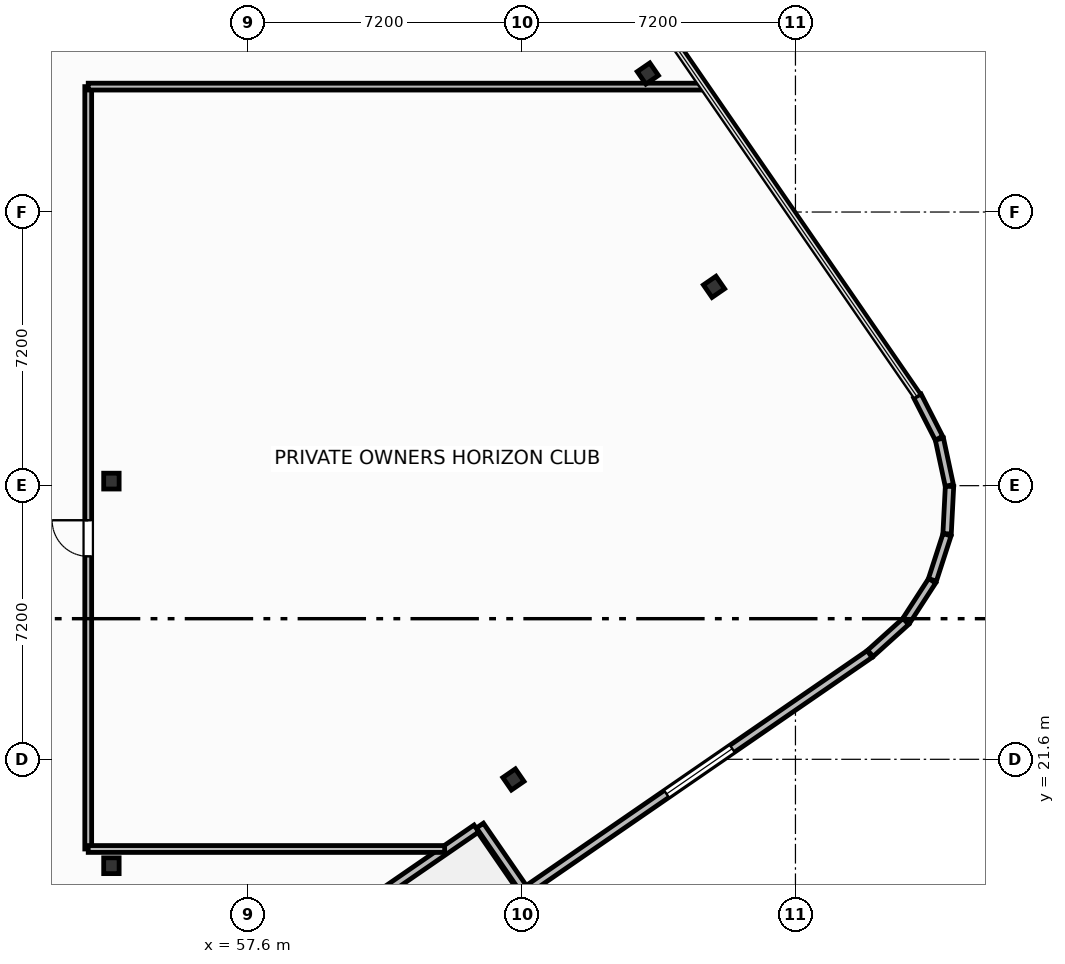
"""IFC4 building model, lengths in metres.
Left out: names, types, materials, properties, quantities, classifications, styles, units other than length and angle.
Written with IfcOpenShell. Run it as: python <this file> out.ifc"""

import sys

from ifc_helpers import new_model, si_unit, direction, frame, frame_2d, origin, origin_2d, place, context, subcontext, project, spatial, rectangle, i_section, extrude, element, fill, save


model = new_model("IFC4")
c1 = context("Model", 3, precision=1e-05, world=origin(), true_north=direction((0.0, 1.0)))
c2 = subcontext(c1, "Body", "Model", "MODEL_VIEW")
j1 = project(units=[si_unit("LENGTHUNIT", "METRE"), si_unit("PLANEANGLEUNIT", "RADIAN")], contexts=[c1])
p1 = place(None, origin())
s1 = spatial("IfcSite", under=j1, at=p1, CompositionType="ELEMENT")
p2 = place(p1, origin())
s2 = spatial("IfcBuilding", under=s1, at=p2, CompositionType="ELEMENT")
p3 = place(p2, frame((0.0, 0.0, 265.6)))
s3 = spatial("IfcBuildingStorey", under=s2, at=p3, CompositionType="ELEMENT", Elevation=265.6)
for number, where, z_axis, x_axis in (
    (1, (54.0, 18.8, 0.0), (0.0, 0.0, 1.0), (1.0, 0.0, 0.0)),
    (2, (54.0, 28.92, 0.0), (0.0, 0.0, 1.0), (1.0, 0.0, 0.0)),
):
    element("IfcColumn", number, at=place(p3, frame(where, z_axis=z_axis, x_axis=x_axis)), inside=s3, PredefinedType="COLUMN", context=c2, shape_type="SweptSolid", body=[
        extrude(i_section(OverallWidth=0.406, OverallDepth=0.416, WebThickness=0.03, FlangeThickness=0.048, FilletRadius=0.025, at=origin_2d()), origin(), (0.0, 0.0, 1.0), 3.7),
    ])
for number, where, z_axis, x_axis in (
    (3, (64.578, 21.07, 0.0), (0.0, 0.0, 1.0), (0.824, 0.567, 0.0)),
    (4, (69.857, 34.031, 0.0), (0.0, 0.0, 1.0), (0.824, 0.567, 0.0)),
    (5, (68.115, 39.644, 0.0), (0.0, 0.0, 1.0), (0.824, 0.567, 0.0)),
):
    element("IfcColumn", number, at=place(p3, frame(where, z_axis=z_axis, x_axis=x_axis)), inside=s3, PredefinedType="COLUMN", context=c2, shape_type="SweptSolid", body=[
        extrude(i_section(OverallWidth=0.401, OverallDepth=0.399, WebThickness=0.025, FlangeThickness=0.04, FilletRadius=0.022, at=origin_2d()), origin(), (0.0, 0.0, 1.0), 3.7),
    ])
p4 = place(p3, frame((63.605, 19.78, 0.0), z_axis=(0.0, 0.0, 1.0), x_axis=(-0.823541290762, -0.567256328665, 0.0)))
e6 = element("IfcWall", 6, at=p4, inside=s3, PredefinedType="SOLIDWALL", context=c2, shape_type="SweptSolid", body=[
    extrude(rectangle(XDim=5.567, YDim=0.22, at=frame_2d((2.784, 0.0))), origin(), (0.0, 0.0, 1.0), 2.73),
])
p5 = place(p4, frame((3.067, 0.0, 0.0)))
e7 = element("IfcOpeningElement", 7, at=p5, cuts=e6, PredefinedType="OPENING", context=c2, shape_type="SweptSolid", body=[
    extrude(rectangle(XDim=2.1, YDim=2.3, at=frame_2d((1.05, 1.15))), frame((0.0, 0.12, 0.0), z_axis=(0.0, -1.0, 0.0), x_axis=(1.0, 0.0, 0.0)), (0.0, 0.0, 1.0), 0.24),
])
p6 = place(p3, frame((63.698, 19.856, 0.0), z_axis=(0.0, 0.0, 1.0), x_axis=(0.567219383419, -0.823566737474, 0.0)))
e8 = element("IfcWall", 8, at=p6, inside=s3, PredefinedType="SOLIDWALL", context=c2, shape_type="SweptSolid", body=[
    extrude(rectangle(XDim=2.1, YDim=0.22, at=frame_2d((1.05, 0.0))), origin(), (0.0, 0.0, 1.0), 2.73),
])
p7 = place(p3, frame((64.992, 18.198, 0.0), z_axis=(0.0, 0.0, 1.0), x_axis=(0.823538117322, 0.56726093583, 0.0)))
e9 = element("IfcWall", 9, at=p7, inside=s3, PredefinedType="SOLIDWALL", context=c2, shape_type="SweptSolid", body=[
    extrude(rectangle(XDim=10.88, YDim=0.22, at=frame_2d((5.44, 0.0))), origin(), (0.0, 0.0, 1.0), 2.73),
])
p8 = place(p7, frame((4.39, 0.0, 0.8)))
e10 = element("IfcOpeningElement", 10, at=p8, cuts=e9, PredefinedType="OPENING", context=c2, shape_type="SweptSolid", body=[
    extrude(rectangle(XDim=2.1, YDim=1.75, at=frame_2d((1.05, 0.875))), frame((0.0, 0.12, 0.0), z_axis=(0.0, -1.0, 0.0), x_axis=(1.0, 0.0, 0.0)), (0.0, 0.0, 1.0), 0.24),
])
p9 = place(p3, frame((73.971, 24.387, 0.0), z_axis=(0.0, 0.0, 1.0), x_axis=(0.742501517089, 0.669844382764, 0.0)))
e11 = element("IfcWall", 11, at=p9, inside=s3, PredefinedType="SOLIDWALL", context=c2, shape_type="SweptSolid", body=[
    extrude(rectangle(XDim=1.257, YDim=0.22, at=frame_2d((0.628, 0.0))), origin(), (0.0, 0.0, 1.0), 2.73),
])
p10 = place(p3, frame((74.917, 25.25, 0.0), z_axis=(0.0, 0.0, 1.0), x_axis=(0.543778157277, 0.839229000731, 0.0)))
e12 = element("IfcWall", 12, at=p10, inside=s3, PredefinedType="SOLIDWALL", context=c2, shape_type="SweptSolid", body=[
    extrude(rectangle(XDim=1.249, YDim=0.22, at=frame_2d((0.624, 0.0))), origin(), (0.0, 0.0, 1.0), 2.73),
])
for number, where, z_axis, x_axis in (
    (13, (75.604, 26.321, 0.0), (0.0, 0.0, 1.0), (0.308, 0.951, 0.0)),
    (14, (75.99, 27.534, 0.0), (0.0, 0.0, 1.0), (0.051, 0.999, 0.0)),
    (15, (76.049, 28.805, 0.0), (0.0, 0.0, 1.0), (-0.209, 0.978, 0.0)),
    (16, (75.777, 30.049, 0.0), (0.0, 0.0, 1.0), (-0.455, 0.891, 0.0)),
):
    element("IfcWall", number, at=place(p3, frame(where, z_axis=z_axis, x_axis=x_axis)), inside=s3, PredefinedType="SOLIDWALL", context=c2, shape_type="SweptSolid", body=[
        extrude(rectangle(XDim=1.249, YDim=0.22, at=frame_2d((0.625, 0.0))), origin(), (0.0, 0.0, 1.0), 2.73),
    ])
p11 = place(p3, frame((53.39, 19.24, 0.0), z_axis=(0.0, 0.0, 1.0), x_axis=(0.0, 1.0, 0.0)))
e17 = element("IfcWall", 17, at=p11, inside=s3, PredefinedType="PARTITIONING", context=c2, shape_type="SweptSolid", body=[
    extrude(rectangle(XDim=20.06, YDim=0.18, at=frame_2d((10.03, 0.0))), origin(), (0.0, 0.0, 1.0), 3.45),
])
p12 = place(p11, frame((7.7, 0.0, 0.0)))
e18 = element("IfcOpeningElement", 18, at=p12, cuts=e17, PredefinedType="OPENING", context=c2, shape_type="SweptSolid", body=[
    extrude(rectangle(XDim=0.95, YDim=2.05, at=frame_2d((0.475, 1.025))), frame((0.0, 0.1, 0.0), z_axis=(0.0, -1.0, 0.0), x_axis=(1.0, 0.0, 0.0)), (0.0, 0.0, 1.0), 0.2),
])
p13 = place(p3, frame((53.39, 19.24, 0.0), z_axis=(0.0, 0.0, 1.0), x_axis=(1.0, 0.0, 0.0)))
e19 = element("IfcWall", 19, at=p13, inside=s3, PredefinedType="PARTITIONING", context=c2, shape_type="SweptSolid", body=[
    extrude(rectangle(XDim=9.378, YDim=0.18, at=frame_2d((4.689, 0.0))), origin(), (0.0, 0.0, 1.0), 2.739),
])
p14 = place(p3, frame((53.39, 39.3, 0.0), z_axis=(0.0, 0.0, 1.0), x_axis=(1.0, 0.0, 0.0)))
e20 = element("IfcWall", 20, at=p14, inside=s3, PredefinedType="PARTITIONING", context=c2, shape_type="SweptSolid", body=[
    extrude(rectangle(XDim=16.149, YDim=0.18, at=frame_2d((8.075, 0.0))), origin(), (0.0, 0.0, 1.0), 2.739),
])
p15 = place(p8, origin())
e21 = element("IfcWindow", 21, at=p15, inside=s3, PartitioningType="SINGLE_PANEL", PredefinedType="WINDOW", context=c2, shape_type="SweptSolid", body=[
    extrude(rectangle(XDim=2.1, YDim=1.75, at=frame_2d((1.05, 0.875))), frame((0.0, 0.03, 0.0), z_axis=(0.0, -1.0, 0.0), x_axis=(1.0, 0.0, 0.0)), (0.0, 0.0, 1.0), 0.06),
])
fill(e10, e21)
p16 = place(p12, origin())
e22 = element("IfcDoor", 22, at=p16, inside=s3, OperationType="SINGLE_SWING_RIGHT", PredefinedType="DOOR", context=c2, shape_type="SweptSolid", body=[
    extrude(rectangle(XDim=0.95, YDim=2.05, at=frame_2d((0.475, 1.025))), frame((0.0, 0.025, 0.0), z_axis=(0.0, -1.0, 0.0), x_axis=(1.0, 0.0, 0.0)), (0.0, 0.0, 1.0), 0.05),
])
fill(e18, e22)
save(model, sys.argv[1])
